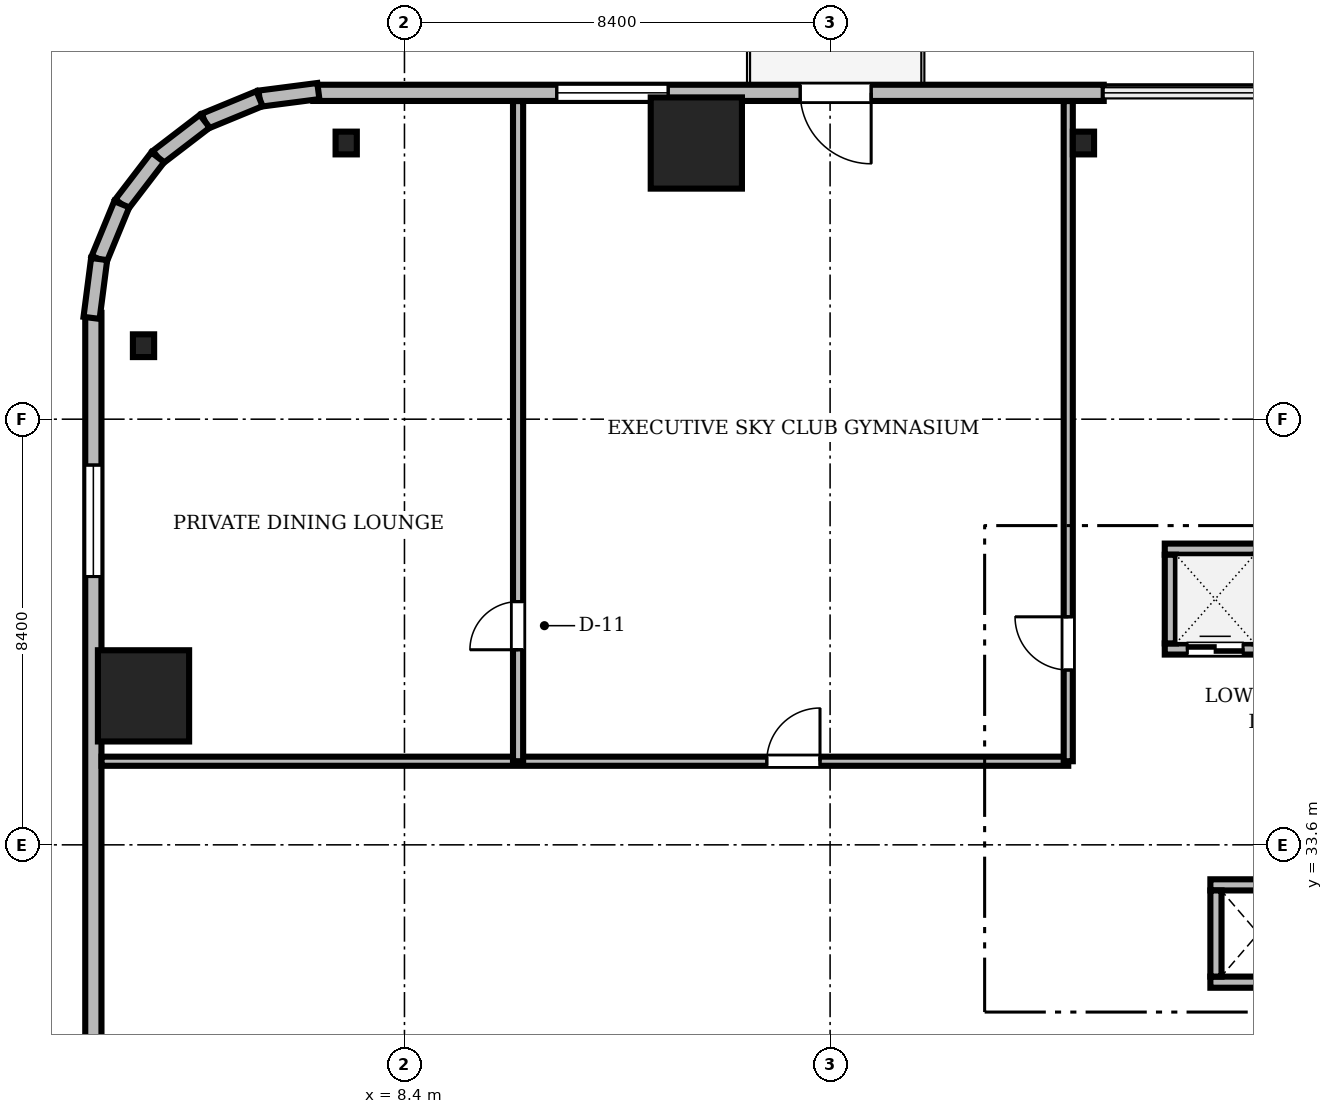
"""IFC4 building model, lengths in metres.
Left out: names, types, materials, properties, quantities, classifications, styles, units other than length and angle.
Written with IfcOpenShell. Run it as: python <this file> out.ifc"""

import sys

from ifc_helpers import new_model, si_unit, direction, frame, frame_2d, origin, origin_2d, place, context, subcontext, project, spatial, rectangle, i_section, extrude, source, transform, mapped, element, fill, save


model = new_model("IFC4")
c1 = context("Model", 3, precision=1e-05, world=origin(), true_north=direction((0.0, 1.0)))
c2 = subcontext(c1, "Body", "Model", "MODEL_VIEW")
j1 = project(units=[si_unit("LENGTHUNIT", "METRE"), si_unit("PLANEANGLEUNIT", "RADIAN")], contexts=[c1])
p1 = place(None, origin())
s1 = spatial("IfcSite", under=j1, at=p1, CompositionType="ELEMENT")
p2 = place(p1, origin())
s2 = spatial("IfcBuilding", under=s1, at=p2, CompositionType="ELEMENT")
p3 = place(p2, frame((0.0, 0.0, 67.75)))
s3 = spatial("IfcBuildingStorey", under=s2, at=p3, CompositionType="ELEMENT", Elevation=67.75)
m1 = source(origin(), c2, "Body", "SweptSolid", [
    extrude(rectangle(XDim=1.8, YDim=1.8, at=origin_2d()), origin(), (0.0, 0.0, 1.0), 3.41),
])
for number, where, z_axis, x_axis in (
    (1, (14.16, 47.45, 0.0), (0.0, 0.0, 1.0), (1.0, 0.0, 0.0)),
    (2, (3.25, 36.54, 0.0), (0.0, 0.0, 1.0), (1.0, 0.0, 0.0)),
):
    element("IfcColumn", number, at=place(p3, frame(where, z_axis=z_axis, x_axis=x_axis)), inside=s3, PredefinedType="COLUMN", context=c2, shape_type="MappedRepresentation", body=[
        mapped(m1, transform((0.0, 0.0, 0.0), scale=1.0)),
    ])
m2 = source(origin(), c2, "Body", "SweptSolid", [
    extrude(i_section(OverallWidth=0.419, OverallDepth=0.449, WebThickness=0.031, FlangeThickness=0.048, FilletRadius=0.015, at=origin_2d()), origin(), (0.0, 0.0, 1.0), 3.41),
])
for number, where, z_axis, x_axis in (
    (3, (21.8, 47.45, 0.0), (0.0, 0.0, 1.0), (1.0, 0.0, 0.0)),
    (4, (7.25, 47.45, 0.0), (0.0, 0.0, 1.0), (1.0, 0.0, 0.0)),
    (5, (3.25, 43.45, 0.0), (0.0, 0.0, 1.0), (1.0, 0.0, 0.0)),
):
    element("IfcColumn", number, at=place(p3, frame(where, z_axis=z_axis, x_axis=x_axis)), inside=s3, PredefinedType="COLUMN", context=c2, shape_type="MappedRepresentation", body=[
        mapped(m2, transform((0.0, 0.0, 0.0), scale=1.0)),
    ])
m3 = source(origin(), c2, "Body", "SweptSolid", [
    extrude(rectangle(XDim=15.6, YDim=0.32, at=frame_2d((7.8, 0.0))), origin(), (0.0, 0.0, 1.0), 3.41),
])
p4 = place(p3, frame((22.2, 48.44, 0.0), z_axis=(0.0, 0.0, 1.0), x_axis=(-1.0, 0.0, 0.0)))
e6 = element("IfcWall", 6, at=p4, inside=s3, PredefinedType="SOLIDWALL", context=c2, shape_type="MappedRepresentation", body=[
    mapped(m3, transform((0.0, 0.0, 0.0), scale=1.0)),
])
m4 = source(origin(), c2, "Body", "SweptSolid", [
    extrude(rectangle(XDim=1.4, YDim=2.3, at=frame_2d((0.7, 1.15))), frame((0.0, 0.17, 0.0), z_axis=(0.0, -1.0, 0.0), x_axis=(1.0, 0.0, 0.0)), (0.0, 0.0, 1.0), 0.34),
])
p5 = place(p4, frame((4.59, 0.0, 0.0)))
e7 = element("IfcOpeningElement", 7, at=p5, cuts=e6, PredefinedType="OPENING", context=c2, shape_type="MappedRepresentation", body=[
    mapped(m4, transform((0.0, 0.0, 0.0), scale=1.0)),
])
m5 = source(origin(), c2, "Body", "SweptSolid", [
    extrude(rectangle(XDim=2.2, YDim=2.4, at=frame_2d((1.1, 1.2))), frame((0.0, 0.17, 0.0), z_axis=(0.0, -1.0, 0.0), x_axis=(1.0, 0.0, 0.0)), (0.0, 0.0, 1.0), 0.34),
])
p6 = place(p4, frame((8.595, 0.0, 0.72)))
e8 = element("IfcOpeningElement", 8, at=p6, cuts=e6, PredefinedType="OPENING", context=c2, shape_type="MappedRepresentation", body=[
    mapped(m5, transform((0.0, 0.0, 0.0), scale=1.0)),
])
m6 = source(origin(), c2, "Body", "SweptSolid", [
    extrude(rectangle(XDim=15.6, YDim=0.32, at=frame_2d((7.8, 0.0))), origin(), (0.0, 0.0, 1.0), 3.41),
])
p7 = place(p3, frame((2.26, 44.1, 0.0), z_axis=(0.0, 0.0, 1.0), x_axis=(0.0, -1.0, 0.0)))
e9 = element("IfcWall", 9, at=p7, inside=s3, PredefinedType="SOLIDWALL", context=c2, shape_type="MappedRepresentation", body=[
    mapped(m6, transform((0.0, 0.0, 0.0), scale=1.0)),
])
p8 = place(p7, frame((3.005, 0.0, 0.72)))
e10 = element("IfcOpeningElement", 10, at=p8, cuts=e9, PredefinedType="OPENING", context=c2, shape_type="MappedRepresentation", body=[
    mapped(m5, transform((0.0, 0.0, 0.0), scale=1.0)),
])
m7 = source(origin(), c2, "Body", "SweptSolid", [
    extrude(rectangle(XDim=1.17, YDim=0.32, at=frame_2d((0.585, 0.0))), origin(), (0.0, 0.0, 1.0), 3.41),
])
p9 = place(p3, frame((6.7, 48.476, 0.0), z_axis=(0.0, 0.0, 1.0), x_axis=(-0.991735963317, -0.128295670475, 0.0)))
e11 = element("IfcWall", 11, at=p9, inside=s3, PredefinedType="SOLIDWALL", context=c2, shape_type="MappedRepresentation", body=[
    mapped(m7, transform((0.0, 0.0, 0.0), scale=1.0)),
])
m8 = source(origin(), c2, "Body", "SweptSolid", [
    extrude(rectangle(XDim=1.169, YDim=0.32, at=frame_2d((0.584, 0.0))), origin(), (0.0, 0.0, 1.0), 3.41),
])
p10 = place(p3, frame((5.54, 48.325, 0.0), z_axis=(0.0, 0.0, 1.0), x_axis=(-0.924552646638, -0.381054331552, 0.0)))
e12 = element("IfcWall", 12, at=p10, inside=s3, PredefinedType="SOLIDWALL", context=c2, shape_type="MappedRepresentation", body=[
    mapped(m8, transform((0.0, 0.0, 0.0), scale=1.0)),
])
m9 = source(origin(), c2, "Body", "SweptSolid", [
    extrude(rectangle(XDim=1.169, YDim=0.32, at=frame_2d((0.584, 0.0))), origin(), (0.0, 0.0, 1.0), 3.41),
])
p11 = place(p3, frame((4.459, 47.88, 0.0), z_axis=(0.0, 0.0, 1.0), x_axis=(-0.793663520347, -0.608356981114, 0.0)))
e13 = element("IfcWall", 13, at=p11, inside=s3, PredefinedType="SOLIDWALL", context=c2, shape_type="MappedRepresentation", body=[
    mapped(m9, transform((0.0, 0.0, 0.0), scale=1.0)),
])
m10 = source(origin(), c2, "Body", "SweptSolid", [
    extrude(rectangle(XDim=1.169, YDim=0.32, at=frame_2d((0.584, 0.0))), origin(), (0.0, 0.0, 1.0), 3.41),
])
p12 = place(p3, frame((3.531, 47.169, 0.0), z_axis=(0.0, 0.0, 1.0), x_axis=(-0.608387696831, -0.793639975269, 0.0)))
e14 = element("IfcWall", 14, at=p12, inside=s3, PredefinedType="SOLIDWALL", context=c2, shape_type="MappedRepresentation", body=[
    mapped(m10, transform((0.0, 0.0, 0.0), scale=1.0)),
])
p13 = place(p3, frame((2.82, 46.241, 0.0), z_axis=(0.0, 0.0, 1.0), x_axis=(-0.381054331552, -0.924552646638, 0.0)))
e15 = element("IfcWall", 15, at=p13, inside=s3, PredefinedType="SOLIDWALL", context=c2, shape_type="MappedRepresentation", body=[
    mapped(m8, transform((0.0, 0.0, 0.0), scale=1.0)),
])
p14 = place(p3, frame((2.375, 45.16, 0.0), z_axis=(0.0, 0.0, 1.0), x_axis=(-0.128295670475, -0.991735963317, 0.0)))
e16 = element("IfcWall", 16, at=p14, inside=s3, PredefinedType="SOLIDWALL", context=c2, shape_type="MappedRepresentation", body=[
    mapped(m7, transform((0.0, 0.0, 0.0), scale=1.0)),
])
m11 = source(origin(), c2, "Body", "SweptSolid", [
    extrude(rectangle(XDim=1.99, YDim=0.22, at=frame_2d((0.995, 0.0))), origin(), (0.0, 0.0, 1.0), 3.41),
])
p15 = place(p3, frame((23.405, 37.465, 0.0), z_axis=(0.0, 0.0, 1.0), x_axis=(1.0, 0.0, 0.0)))
e17 = element("IfcWall", 17, at=p15, inside=s3, PredefinedType="SOLIDWALL", context=c2, shape_type="MappedRepresentation", body=[
    mapped(m11, transform((0.0, 0.0, 0.0), scale=1.0)),
])
m12 = source(origin(), c2, "Body", "SweptSolid", [
    extrude(rectangle(XDim=1.1, YDim=2.2, at=frame_2d((0.55, 1.1))), frame((0.0, 0.12, 0.0), z_axis=(0.0, -1.0, 0.0), x_axis=(1.0, 0.0, 0.0)), (0.0, 0.0, 1.0), 0.24),
])
p16 = place(p15, frame((0.445, 0.0, 0.0)))
e18 = element("IfcOpeningElement", 18, at=p16, cuts=e17, PredefinedType="OPENING", context=c2, shape_type="MappedRepresentation", body=[
    mapped(m12, transform((0.0, 0.0, 0.0), scale=1.0)),
])
p17 = place(p3, frame((23.405, 39.435, 0.0), z_axis=(0.0, 0.0, 1.0), x_axis=(1.0, 0.0, 0.0)))
e19 = element("IfcWall", 19, at=p17, inside=s3, PredefinedType="SOLIDWALL", context=c2, shape_type="MappedRepresentation", body=[
    mapped(m11, transform((0.0, 0.0, 0.0), scale=1.0)),
])
m13 = source(origin(), c2, "Body", "SweptSolid", [
    extrude(rectangle(XDim=1.75, YDim=0.22, at=frame_2d((0.875, 0.0))), origin(), (0.0, 0.0, 1.0), 3.41),
])
p18 = place(p3, frame((23.515, 37.575, 0.0), z_axis=(0.0, 0.0, 1.0), x_axis=(0.0, 1.0, 0.0)))
e20 = element("IfcWall", 20, at=p18, inside=s3, PredefinedType="SOLIDWALL", context=c2, shape_type="MappedRepresentation", body=[
    mapped(m13, transform((0.0, 0.0, 0.0), scale=1.0)),
])
m14 = source(origin(), c2, "Body", "SweptSolid", [
    extrude(rectangle(XDim=1.89, YDim=0.22, at=frame_2d((0.945, 0.0))), origin(), (0.0, 0.0, 1.0), 3.41),
])
for number, where, z_axis, x_axis in (
    (21, (24.305, 30.89, 0.0), (0.0, 0.0, 1.0), (1.0, 0.0, 0.0)),
    (22, (24.305, 32.81, 0.0), (0.0, 0.0, 1.0), (1.0, 0.0, 0.0)),
):
    element("IfcWall", number, at=place(p3, frame(where, z_axis=z_axis, x_axis=x_axis)), inside=s3, PredefinedType="SOLIDWALL", context=c2, shape_type="MappedRepresentation", body=[
        mapped(m14, transform((0.0, 0.0, 0.0), scale=1.0)),
    ])
m15 = source(origin(), c2, "Body", "SweptSolid", [
    extrude(rectangle(XDim=1.7, YDim=0.22, at=frame_2d((0.85, 0.0))), origin(), (0.0, 0.0, 1.0), 3.41),
])
p19 = place(p3, frame((24.415, 31.0, 0.0), z_axis=(0.0, 0.0, 1.0), x_axis=(0.0, 1.0, 0.0)))
e23 = element("IfcWall", 23, at=p19, inside=s3, PredefinedType="SOLIDWALL", context=c2, shape_type="MappedRepresentation", body=[
    mapped(m15, transform((0.0, 0.0, 0.0), scale=1.0)),
])
m16 = source(origin(), c2, "Body", "SweptSolid", [
    extrude(rectangle(XDim=19.078, YDim=0.18, at=frame_2d((9.539, 0.0))), origin(), (0.0, 0.0, 1.0), 2.652),
])
p20 = place(p3, frame((2.422, 35.25, 0.0), z_axis=(0.0, 0.0, 1.0), x_axis=(1.0, 0.0, 0.0)))
e24 = element("IfcWall", 24, at=p20, inside=s3, PredefinedType="PARTITIONING", context=c2, shape_type="MappedRepresentation", body=[
    mapped(m16, transform((0.0, 0.0, 0.0), scale=1.0)),
])
m17 = source(origin(), c2, "Body", "SweptSolid", [
    extrude(rectangle(XDim=1.05, YDim=2.2, at=frame_2d((0.525, 1.1))), frame((0.0, 0.1, 0.0), z_axis=(0.0, -1.0, 0.0), x_axis=(1.0, 0.0, 0.0)), (0.0, 0.0, 1.0), 0.2),
])
p21 = place(p20, frame((13.129, 0.0, 0.0)))
e25 = element("IfcOpeningElement", 25, at=p21, cuts=e24, PredefinedType="OPENING", context=c2, shape_type="MappedRepresentation", body=[
    mapped(m17, transform((0.0, 0.0, 0.0), scale=1.0)),
])
m18 = source(origin(), c2, "Body", "SweptSolid", [
    extrude(rectangle(XDim=13.028, YDim=0.2, at=frame_2d((6.514, 0.0))), origin(), (0.0, 0.0, 1.0), 2.652),
])
p22 = place(p3, frame((10.642, 35.25, 0.0), z_axis=(0.0, 0.0, 1.0), x_axis=(0.0, 1.0, 0.0)))
e26 = element("IfcWall", 26, at=p22, inside=s3, PredefinedType="PARTITIONING", context=c2, shape_type="MappedRepresentation", body=[
    mapped(m18, transform((0.0, 0.0, 0.0), scale=1.0)),
])
m19 = source(origin(), c2, "Body", "SweptSolid", [
    extrude(rectangle(XDim=0.95, YDim=2.15, at=frame_2d((0.475, 1.075))), frame((0.0, 0.11, 0.0), z_axis=(0.0, -1.0, 0.0), x_axis=(1.0, 0.0, 0.0)), (0.0, 0.0, 1.0), 0.22),
])
p23 = place(p22, frame((2.2, 0.0, 0.0)))
e27 = element("IfcOpeningElement", 27, at=p23, cuts=e26, PredefinedType="OPENING", context=c2, shape_type="MappedRepresentation", body=[
    mapped(m19, transform((0.0, 0.0, 0.0), scale=1.0)),
])
m20 = source(origin(), c2, "Body", "SweptSolid", [
    extrude(rectangle(XDim=13.028, YDim=0.18, at=frame_2d((6.514, 0.0))), origin(), (0.0, 0.0, 1.0), 2.652),
])
p24 = place(p3, frame((21.5, 35.25, 0.0), z_axis=(0.0, 0.0, 1.0), x_axis=(0.0, 1.0, 0.0)))
e28 = element("IfcWall", 28, at=p24, inside=s3, PredefinedType="PARTITIONING", context=c2, shape_type="MappedRepresentation", body=[
    mapped(m20, transform((0.0, 0.0, 0.0), scale=1.0)),
])
p25 = place(p24, frame((1.8, 0.0, 0.0)))
e29 = element("IfcOpeningElement", 29, at=p25, cuts=e28, PredefinedType="OPENING", context=c2, shape_type="MappedRepresentation", body=[
    mapped(m17, transform((0.0, 0.0, 0.0), scale=1.0)),
])
m21 = source(origin(), c2, "Body", "SweptSolid", [
    extrude(rectangle(XDim=1.4, YDim=2.3, at=frame_2d((0.7, 1.15))), frame((0.0, 0.025, 0.0), z_axis=(0.0, -1.0, 0.0), x_axis=(1.0, 0.0, 0.0)), (0.0, 0.0, 1.0), 0.05),
])
p26 = place(p5, frame((1.4, 0.0, 0.0), z_axis=(0.0, 0.0, 1.0), x_axis=(-1.0, 0.0, 0.0)))
e30 = element("IfcDoor", 30, at=p26, inside=s3, OperationType="DOUBLE_DOOR_SLIDING", PredefinedType="DOOR", context=c2, shape_type="MappedRepresentation", body=[
    mapped(m21, transform((0.0, 0.0, 0.0), scale=1.0)),
])
fill(e7, e30)
m22 = source(origin(), c2, "Body", "SweptSolid", [
    extrude(rectangle(XDim=2.2, YDim=2.4, at=frame_2d((1.1, 1.2))), frame((0.0, 0.03, 0.0), z_axis=(0.0, -1.0, 0.0), x_axis=(1.0, 0.0, 0.0)), (0.0, 0.0, 1.0), 0.06),
])
p27 = place(p6, origin())
e31 = element("IfcWindow", 31, at=p27, inside=s3, PartitioningType="SINGLE_PANEL", PredefinedType="WINDOW", context=c2, shape_type="MappedRepresentation", body=[
    mapped(m22, transform((0.0, 0.0, 0.0), scale=1.0)),
])
fill(e8, e31)
p28 = place(p8, origin())
e32 = element("IfcWindow", 32, at=p28, inside=s3, PartitioningType="SINGLE_PANEL", PredefinedType="WINDOW", context=c2, shape_type="MappedRepresentation", body=[
    mapped(m22, transform((0.0, 0.0, 0.0), scale=1.0)),
])
fill(e10, e32)
m23 = source(origin(), c2, "Body", "SweptSolid", [
    extrude(rectangle(XDim=1.1, YDim=2.2, at=frame_2d((0.55, 1.1))), frame((0.0, 0.025, 0.0), z_axis=(0.0, -1.0, 0.0), x_axis=(1.0, 0.0, 0.0)), (0.0, 0.0, 1.0), 0.05),
])
p29 = place(p16, origin())
e33 = element("IfcDoor", 33, at=p29, inside=s3, OperationType="DOUBLE_DOOR_SLIDING", PredefinedType="DOOR", context=c2, shape_type="MappedRepresentation", body=[
    mapped(m23, transform((0.0, 0.0, 0.0), scale=1.0)),
])
fill(e18, e33)
m24 = source(origin(), c2, "Body", "SweptSolid", [
    extrude(rectangle(XDim=1.05, YDim=2.2, at=frame_2d((0.525, 1.1))), frame((0.0, 0.025, 0.0), z_axis=(0.0, -1.0, 0.0), x_axis=(1.0, 0.0, 0.0)), (0.0, 0.0, 1.0), 0.05),
])
p30 = place(p21, origin())
e34 = element("IfcDoor", 34, at=p30, inside=s3, OperationType="SINGLE_SWING_RIGHT", PredefinedType="DOOR", context=c2, shape_type="MappedRepresentation", body=[
    mapped(m24, transform((0.0, 0.0, 0.0), scale=1.0)),
])
fill(e25, e34)
m25 = source(origin(), c2, "Body", "SweptSolid", [
    extrude(rectangle(XDim=0.95, YDim=2.15, at=frame_2d((0.475, 1.075))), frame((0.0, 0.025, 0.0), z_axis=(0.0, -1.0, 0.0), x_axis=(1.0, 0.0, 0.0)), (0.0, 0.0, 1.0), 0.05),
])
p31 = place(p23, origin())
e35 = element("IfcDoor", 35, at=p31, inside=s3, OperationType="SINGLE_SWING_LEFT", PredefinedType="DOOR", context=c2, shape_type="MappedRepresentation", body=[
    mapped(m25, transform((0.0, 0.0, 0.0), scale=1.0)),
])
fill(e27, e35)
p32 = place(p25, origin())
e36 = element("IfcDoor", 36, at=p32, inside=s3, OperationType="SINGLE_SWING_RIGHT", PredefinedType="DOOR", context=c2, shape_type="MappedRepresentation", body=[
    mapped(m24, transform((0.0, 0.0, 0.0), scale=1.0)),
])
fill(e29, e36)
save(model, sys.argv[1])
